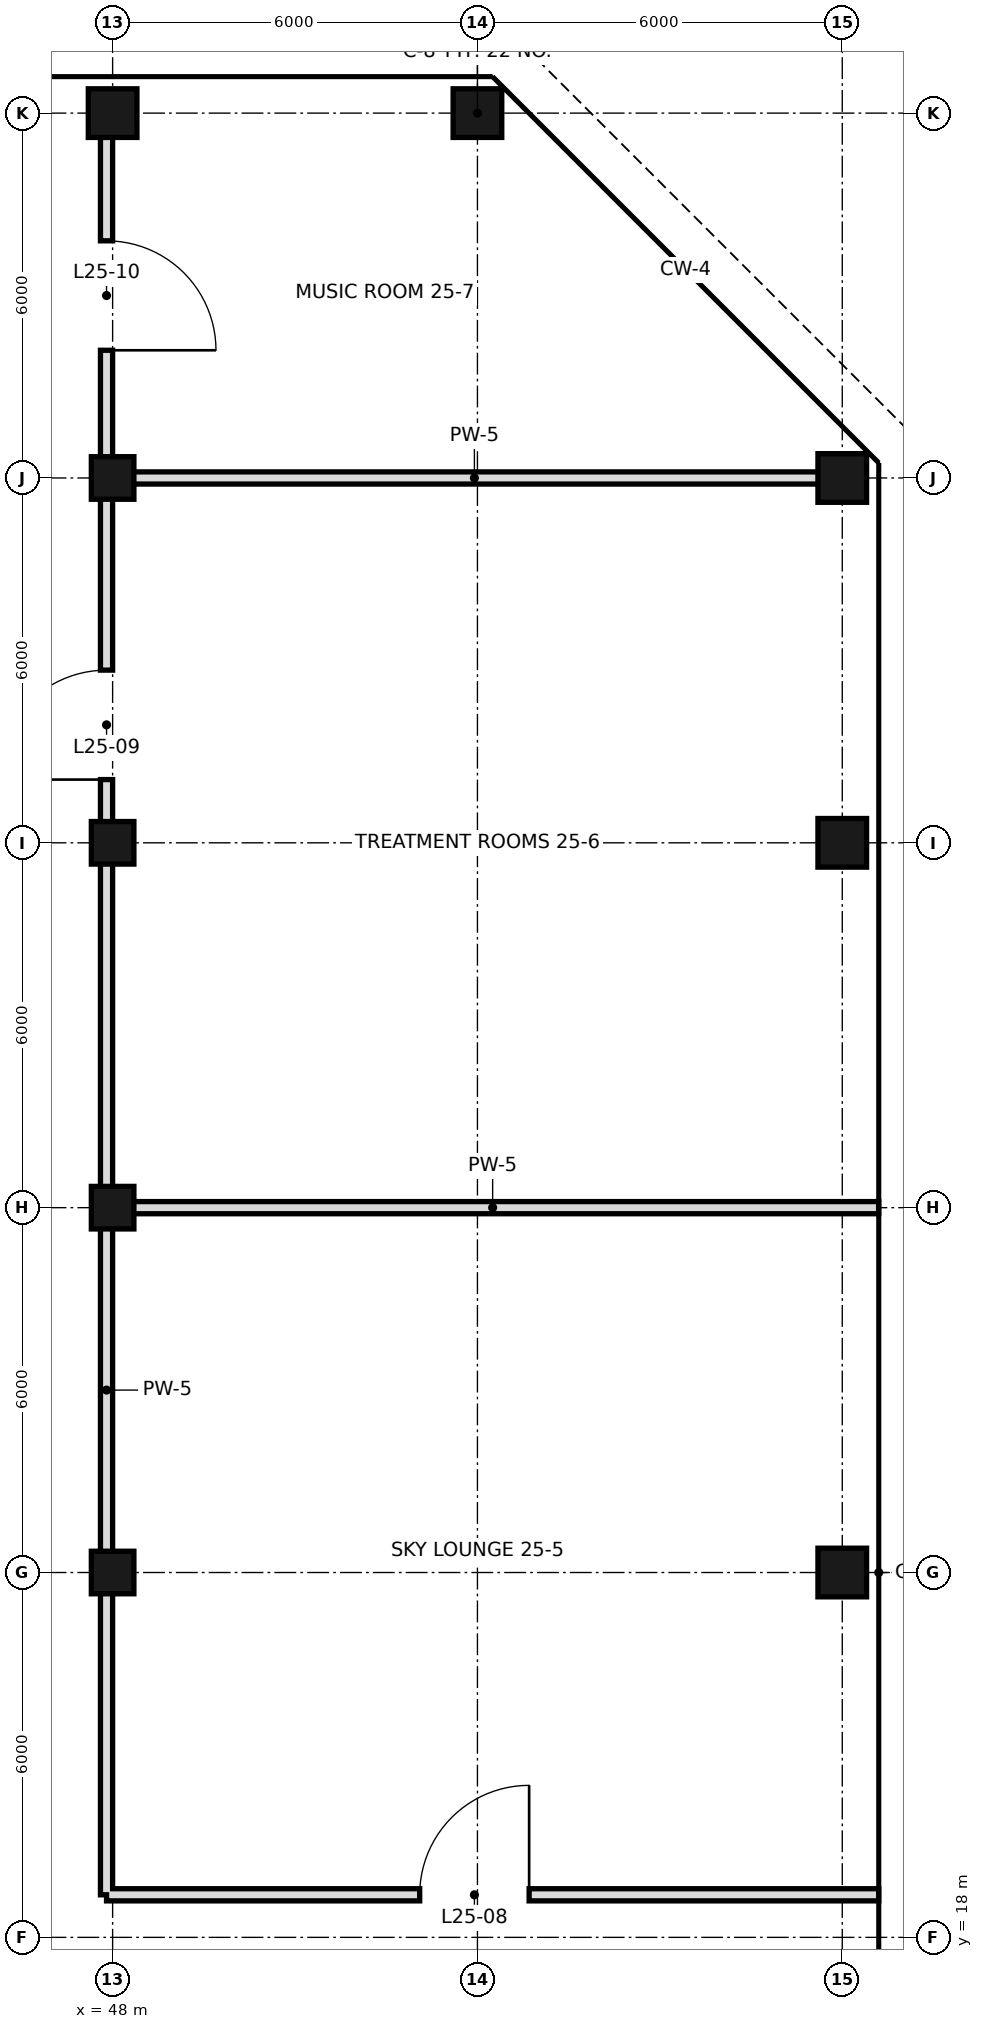
"""IFC4 building model, lengths in metres.
Left out: names, types, materials, properties, quantities, classifications, styles, units other than length and angle.
Written with IfcOpenShell. Run it as: python <this file> out.ifc"""

import sys

from ifc_helpers import new_model, si_unit, direction, frame, frame_2d, origin, origin_2d, place, context, subcontext, project, spatial, rectangle, hollow_rectangle, extrude, element, fill, save


model = new_model("IFC4")
c1 = context("Model", 3, precision=1e-05, world=origin(), true_north=direction((0.0, 1.0)))
c2 = subcontext(c1, "Body", "Model", "MODEL_VIEW")
j1 = project(units=[si_unit("LENGTHUNIT", "METRE"), si_unit("PLANEANGLEUNIT", "RADIAN")], contexts=[c1])
p1 = place(None, origin())
s1 = spatial("IfcSite", under=j1, at=p1, CompositionType="ELEMENT")
p2 = place(p1, origin())
s2 = spatial("IfcBuilding", under=s1, at=p2, CompositionType="ELEMENT")
p3 = place(p2, frame((0.0, 0.0, 114.2)))
s3 = spatial("IfcBuildingStorey", under=s2, at=p3, CompositionType="ELEMENT", Elevation=114.2)
for number, where, z_axis, x_axis in (
    (1, (48.0, 24.0, 0.0), (0.0, 0.0, 1.0), (1.0, 0.0, 0.0)),
    (2, (48.0, 30.0, 0.0), (0.0, 0.0, 1.0), (1.0, 0.0, 0.0)),
    (3, (48.0, 36.0, 0.0), (0.0, 0.0, 1.0), (1.0, 0.0, 0.0)),
    (4, (48.0, 42.0, 0.0), (0.0, 0.0, 1.0), (1.0, 0.0, 0.0)),
):
    element("IfcColumn", number, at=place(p3, frame(where, z_axis=z_axis, x_axis=x_axis)), inside=s3, PredefinedType="COLUMN", context=c2, shape_type="SweptSolid", body=[
        extrude(hollow_rectangle(XDim=0.7, YDim=0.7, WallThickness=0.036, at=origin_2d()), origin(), (0.0, 0.0, 1.0), 5.4),
    ])
for number, where, z_axis, x_axis in (
    (5, (48.0, 48.0, 0.0), (0.0, 0.0, 1.0), (1.0, 0.0, 0.0)),
    (6, (54.0, 48.0, 0.0), (0.0, 0.0, 1.0), (1.0, 0.0, 0.0)),
    (7, (60.0, 24.0, 0.0), (0.0, 0.0, 1.0), (1.0, 0.0, 0.0)),
    (8, (60.0, 36.0, 0.0), (0.0, 0.0, 1.0), (1.0, 0.0, 0.0)),
    (9, (60.0, 42.0, 0.0), (0.0, 0.0, 1.0), (1.0, 0.0, 0.0)),
):
    element("IfcColumn", number, at=place(p3, frame(where, z_axis=z_axis, x_axis=x_axis)), inside=s3, PredefinedType="COLUMN", context=c2, shape_type="SweptSolid", body=[
        extrude(hollow_rectangle(XDim=0.8, YDim=0.8, WallThickness=0.04, at=origin_2d()), origin(), (0.0, 0.0, 1.0), 5.4),
    ])
p4 = place(p3, frame((47.9, 18.7, 0.0), z_axis=(0.0, 0.0, 1.0), x_axis=(0.0, 1.0, 0.0)))
e10 = element("IfcWall", 10, at=p4, inside=s3, PredefinedType="SOLIDWALL", context=c2, shape_type="SweptSolid", body=[
    extrude(rectangle(XDim=29.3, YDim=0.2, at=frame_2d((14.65, 0.0))), origin(), (0.0, 0.0, 1.0), 4.52),
])
p5 = place(p4, frame((18.34, 0.0, 0.0)))
e11 = element("IfcOpeningElement", 11, at=p5, cuts=e10, PredefinedType="OPENING", context=c2, shape_type="SweptSolid", body=[
    extrude(rectangle(XDim=1.8, YDim=2.4, at=frame_2d((0.9, 1.2))), frame((0.0, 0.11, 0.0), z_axis=(0.0, -1.0, 0.0), x_axis=(1.0, 0.0, 0.0)), (0.0, 0.0, 1.0), 0.22),
])
p6 = place(p4, frame((25.4, 0.0, 0.0)))
e12 = element("IfcOpeningElement", 12, at=p6, cuts=e10, PredefinedType="OPENING", context=c2, shape_type="SweptSolid", body=[
    extrude(rectangle(XDim=1.8, YDim=2.4, at=frame_2d((0.9, 1.2))), frame((0.0, 0.11, 0.0), z_axis=(0.0, -1.0, 0.0), x_axis=(1.0, 0.0, 0.0)), (0.0, 0.0, 1.0), 0.22),
])
p7 = place(p3, frame((47.9, 18.7, 0.0), z_axis=(0.0, 0.0, 1.0), x_axis=(1.0, 0.0, 0.0)))
e13 = element("IfcWall", 13, at=p7, inside=s3, PredefinedType="SOLIDWALL", context=c2, shape_type="SweptSolid", body=[
    extrude(rectangle(XDim=12.7, YDim=0.2, at=frame_2d((6.35, 0.0))), origin(), (0.0, 0.0, 1.0), 4.52),
])
p8 = place(p7, frame((5.15, 0.0, 0.0)))
e14 = element("IfcOpeningElement", 14, at=p8, cuts=e13, PredefinedType="OPENING", context=c2, shape_type="SweptSolid", body=[
    extrude(rectangle(XDim=1.8, YDim=2.4, at=frame_2d((0.9, 1.2))), frame((0.0, 0.11, 0.0), z_axis=(0.0, -1.0, 0.0), x_axis=(1.0, 0.0, 0.0)), (0.0, 0.0, 1.0), 0.22),
])
p9 = place(p3, frame((47.9, 30.0, 0.0), z_axis=(0.0, 0.0, 1.0), x_axis=(1.0, 0.0, 0.0)))
e15 = element("IfcWall", 15, at=p9, inside=s3, PredefinedType="SOLIDWALL", context=c2, shape_type="SweptSolid", body=[
    extrude(rectangle(XDim=12.7, YDim=0.2, at=frame_2d((6.35, 0.0))), origin(), (0.0, 0.0, 1.0), 4.52),
])
p10 = place(p3, frame((47.9, 42.0, 0.0), z_axis=(0.0, 0.0, 1.0), x_axis=(1.0, 0.0, 0.0)))
e16 = element("IfcWall", 16, at=p10, inside=s3, PredefinedType="SOLIDWALL", context=c2, shape_type="SweptSolid", body=[
    extrude(rectangle(XDim=12.1, YDim=0.2, at=frame_2d((6.05, 0.0))), origin(), (0.0, 0.0, 1.0), 4.52),
])
p11 = place(p8, frame((1.8, 0.0, 0.0), z_axis=(0.0, 0.0, 1.0), x_axis=(-1.0, 0.0, 0.0)))
e17 = element("IfcDoor", 17, at=p11, inside=s3, OperationType="SINGLE_SWING_LEFT", PredefinedType="DOOR", context=c2, shape_type="SweptSolid", body=[
    extrude(rectangle(XDim=1.8, YDim=2.4, at=frame_2d((0.9, 1.2))), frame((0.0, 0.025, 0.0), z_axis=(0.0, -1.0, 0.0), x_axis=(1.0, 0.0, 0.0)), (0.0, 0.0, 1.0), 0.05),
])
fill(e14, e17)
p12 = place(p5, origin())
e18 = element("IfcDoor", 18, at=p12, inside=s3, OperationType="SINGLE_SWING_LEFT", PredefinedType="DOOR", context=c2, shape_type="SweptSolid", body=[
    extrude(rectangle(XDim=1.8, YDim=2.4, at=frame_2d((0.9, 1.2))), frame((0.0, 0.025, 0.0), z_axis=(0.0, -1.0, 0.0), x_axis=(1.0, 0.0, 0.0)), (0.0, 0.0, 1.0), 0.05),
])
fill(e11, e18)
p13 = place(p6, frame((1.8, 0.0, 0.0), z_axis=(0.0, 0.0, 1.0), x_axis=(-1.0, 0.0, 0.0)))
e19 = element("IfcDoor", 19, at=p13, inside=s3, OperationType="SINGLE_SWING_RIGHT", PredefinedType="DOOR", context=c2, shape_type="SweptSolid", body=[
    extrude(rectangle(XDim=1.8, YDim=2.4, at=frame_2d((0.9, 1.2))), frame((0.0, 0.025, 0.0), z_axis=(0.0, -1.0, 0.0), x_axis=(1.0, 0.0, 0.0)), (0.0, 0.0, 1.0), 0.05),
])
fill(e12, e19)
save(model, sys.argv[1])
